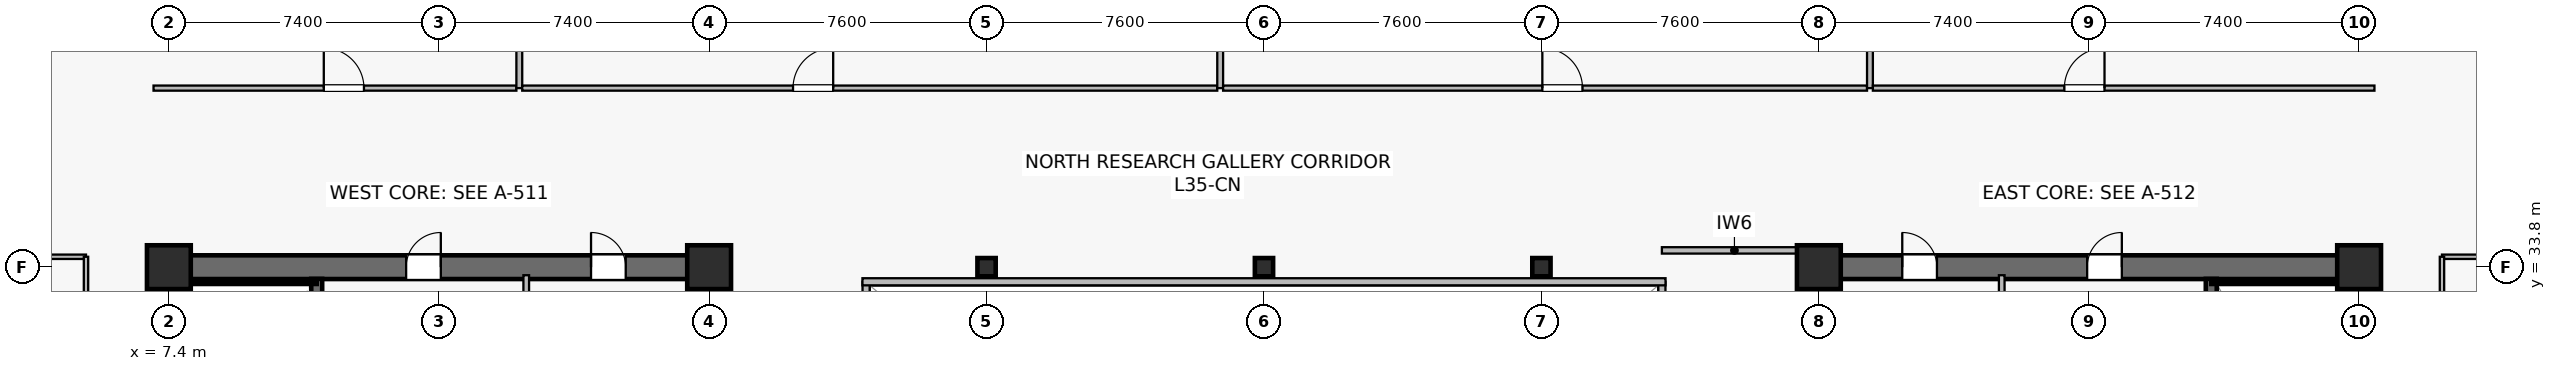
"""IFC4 building model, lengths in metres.
Left out: names, types, materials, properties, quantities, classifications, styles, units other than length and angle.
Written with IfcOpenShell. Run it as: python <this file> out.ifc"""

import sys

from ifc_helpers import new_model, si_unit, direction, frame, frame_2d, origin, origin_2d, place, context, subcontext, project, spatial, rectangle, hollow_rectangle, extrude, source, transform, mapped, element, fill, save


model = new_model("IFC4")
c1 = context("Model", 3, precision=1e-05, world=origin(), true_north=direction((0.0, 1.0)))
c2 = subcontext(c1, "Body", "Model", "MODEL_VIEW")
j1 = project(units=[si_unit("LENGTHUNIT", "METRE"), si_unit("PLANEANGLEUNIT", "RADIAN")], contexts=[c1])
p1 = place(None, origin())
s1 = spatial("IfcSite", under=j1, at=p1, CompositionType="ELEMENT")
p2 = place(p1, origin())
s2 = spatial("IfcBuilding", under=s1, at=p2, CompositionType="ELEMENT")
p3 = place(p2, frame((0.0, 0.0, 146.1)))
s3 = spatial("IfcBuildingStorey", under=s2, at=p3, CompositionType="ELEMENT", Elevation=146.1)
p4 = place(p3, frame((7.075, 33.8, 0.0), z_axis=(0.0, 0.0, 1.0), x_axis=(1.0, 0.0, 0.0)))
e1 = element("IfcWall", 1, at=p4, inside=s3, PredefinedType="SHEAR", context=c2, shape_type="SweptSolid", body=[
    extrude(rectangle(XDim=15.45, YDim=0.65, at=frame_2d((7.725, 0.0))), origin(), (0.0, 0.0, 1.0), 3.79),
])
p5 = place(p4, frame((6.825, 0.0, 0.0)))
e2 = element("IfcOpeningElement", 2, at=p5, cuts=e1, PredefinedType="OPENING", context=c2, shape_type="SweptSolid", body=[
    extrude(rectangle(XDim=0.95, YDim=2.15, at=frame_2d((0.475, 1.075))), frame((0.0, 0.335, 0.0), z_axis=(0.0, -1.0, 0.0), x_axis=(1.0, 0.0, 0.0)), (0.0, 0.0, 1.0), 0.67),
])
p6 = place(p4, frame((11.89, 0.0, 0.0)))
e3 = element("IfcOpeningElement", 3, at=p6, cuts=e1, PredefinedType="OPENING", context=c2, shape_type="SweptSolid", body=[
    extrude(rectangle(XDim=0.95, YDim=2.15, at=frame_2d((0.475, 1.075))), frame((0.0, 0.335, 0.0), z_axis=(0.0, -1.0, 0.0), x_axis=(1.0, 0.0, 0.0)), (0.0, 0.0, 1.0), 0.67),
])
p7 = place(p3, frame((7.4, 15.125, 0.0), z_axis=(0.0, 0.0, 1.0), x_axis=(0.0, 1.0, 0.0)))
e4 = element("IfcWall", 4, at=p7, inside=s3, PredefinedType="SHEAR", context=c2, shape_type="SweptSolid", body=[
    extrude(rectangle(XDim=18.35, YDim=0.65, at=frame_2d((9.175, 0.0))), origin(), (0.0, 0.0, 1.0), 3.79),
])
p8 = place(p3, frame((22.2, 15.125, 0.0), z_axis=(0.0, 0.0, 1.0), x_axis=(0.0, 1.0, 0.0)))
e5 = element("IfcWall", 5, at=p8, inside=s3, PredefinedType="SHEAR", context=c2, shape_type="SweptSolid", body=[
    extrude(rectangle(XDim=18.35, YDim=0.65, at=frame_2d((9.175, 0.0))), origin(), (0.0, 0.0, 1.0), 3.79),
])
p9 = place(p8, frame((3.425, 0.0, 0.0)))
e6 = element("IfcOpeningElement", 6, at=p9, cuts=e5, PredefinedType="OPENING", context=c2, shape_type="SweptSolid", body=[
    extrude(rectangle(XDim=1.42, YDim=2.2, at=frame_2d((0.71, 1.1))), frame((0.0, 0.335, 0.0), z_axis=(0.0, -1.0, 0.0), x_axis=(1.0, 0.0, 0.0)), (0.0, 0.0, 1.0), 0.67),
])
p10 = place(p3, frame((11.45, 24.85, 0.0), z_axis=(0.0, 0.0, 1.0), x_axis=(0.0, 1.0, 0.0)))
e7 = element("IfcWall", 7, at=p10, inside=s3, PredefinedType="SHEAR", context=c2, shape_type="SweptSolid", body=[
    extrude(rectangle(XDim=8.63, YDim=0.3, at=frame_2d((4.315, 0.0))), origin(), (0.0, 0.0, 1.0), 3.79),
])
p11 = place(p10, frame((0.42, 0.0, 0.0)))
e8 = element("IfcOpeningElement", 8, at=p11, cuts=e7, PredefinedType="OPENING", context=c2, shape_type="SweptSolid", body=[
    extrude(rectangle(XDim=1.1, YDim=2.15, at=frame_2d((0.55, 1.075))), frame((0.0, 0.16, 0.0), z_axis=(0.0, -1.0, 0.0), x_axis=(1.0, 0.0, 0.0)), (0.0, 0.0, 1.0), 0.32),
])
p12 = place(p3, frame((7.73, 33.4, 0.0), z_axis=(0.0, 0.0, 1.0), x_axis=(1.0, 0.0, 0.0)))
e9 = element("IfcWall", 9, at=p12, inside=s3, PredefinedType="SOLIDWALL", context=c2, shape_type="SweptSolid", body=[
    extrude(rectangle(XDim=3.72, YDim=0.12, at=frame_2d((1.86, 0.0))), origin(), (0.0, 0.0, 1.0), 3.79),
])
p13 = place(p3, frame((7.73, 25.0, 0.0), z_axis=(0.0, 0.0, 1.0), x_axis=(0.0, 1.0, 0.0)))
e10 = element("IfcWall", 10, at=p13, inside=s3, PredefinedType="SOLIDWALL", context=c2, shape_type="SweptSolid", body=[
    extrude(rectangle(XDim=8.32, YDim=0.12, at=frame_2d((4.16, 0.0))), origin(), (0.0, 0.0, 1.0), 3.79),
])
p14 = place(p3, frame((52.275, 33.8, 0.0), z_axis=(0.0, 0.0, 1.0), x_axis=(1.0, 0.0, 0.0)))
e11 = element("IfcWall", 11, at=p14, inside=s3, PredefinedType="SHEAR", context=c2, shape_type="SweptSolid", body=[
    extrude(rectangle(XDim=15.45, YDim=0.65, at=frame_2d((7.725, 0.0))), origin(), (0.0, 0.0, 1.0), 3.79),
])
p15 = place(p14, frame((7.675, 0.0, 0.0)))
e12 = element("IfcOpeningElement", 12, at=p15, cuts=e11, PredefinedType="OPENING", context=c2, shape_type="SweptSolid", body=[
    extrude(rectangle(XDim=0.95, YDim=2.15, at=frame_2d((0.475, 1.075))), frame((0.0, 0.335, 0.0), z_axis=(0.0, -1.0, 0.0), x_axis=(1.0, 0.0, 0.0)), (0.0, 0.0, 1.0), 0.67),
])
p16 = place(p14, frame((2.61, 0.0, 0.0)))
e13 = element("IfcOpeningElement", 13, at=p16, cuts=e11, PredefinedType="OPENING", context=c2, shape_type="SweptSolid", body=[
    extrude(rectangle(XDim=0.95, YDim=2.15, at=frame_2d((0.475, 1.075))), frame((0.0, 0.335, 0.0), z_axis=(0.0, -1.0, 0.0), x_axis=(1.0, 0.0, 0.0)), (0.0, 0.0, 1.0), 0.67),
])
p17 = place(p3, frame((52.6, 15.125, 0.0), z_axis=(0.0, 0.0, 1.0), x_axis=(0.0, 1.0, 0.0)))
e14 = element("IfcWall", 14, at=p17, inside=s3, PredefinedType="SHEAR", context=c2, shape_type="SweptSolid", body=[
    extrude(rectangle(XDim=18.35, YDim=0.65, at=frame_2d((9.175, 0.0))), origin(), (0.0, 0.0, 1.0), 3.79),
])
p18 = place(p17, frame((3.425, 0.0, 0.0)))
e15 = element("IfcOpeningElement", 15, at=p18, cuts=e14, PredefinedType="OPENING", context=c2, shape_type="SweptSolid", body=[
    extrude(rectangle(XDim=1.42, YDim=2.2, at=frame_2d((0.71, 1.1))), frame((0.0, 0.335, 0.0), z_axis=(0.0, -1.0, 0.0), x_axis=(1.0, 0.0, 0.0)), (0.0, 0.0, 1.0), 0.67),
])
p19 = place(p3, frame((67.4, 15.125, 0.0), z_axis=(0.0, 0.0, 1.0), x_axis=(0.0, 1.0, 0.0)))
e16 = element("IfcWall", 16, at=p19, inside=s3, PredefinedType="SHEAR", context=c2, shape_type="SweptSolid", body=[
    extrude(rectangle(XDim=18.35, YDim=0.65, at=frame_2d((9.175, 0.0))), origin(), (0.0, 0.0, 1.0), 3.79),
])
p20 = place(p3, frame((63.35, 24.85, 0.0), z_axis=(0.0, 0.0, 1.0), x_axis=(0.0, 1.0, 0.0)))
e17 = element("IfcWall", 17, at=p20, inside=s3, PredefinedType="SHEAR", context=c2, shape_type="SweptSolid", body=[
    extrude(rectangle(XDim=8.63, YDim=0.3, at=frame_2d((4.315, 0.0))), origin(), (0.0, 0.0, 1.0), 3.79),
])
p21 = place(p20, frame((0.42, 0.0, 0.0)))
e18 = element("IfcOpeningElement", 18, at=p21, cuts=e17, PredefinedType="OPENING", context=c2, shape_type="SweptSolid", body=[
    extrude(rectangle(XDim=1.1, YDim=2.15, at=frame_2d((0.55, 1.075))), frame((0.0, 0.16, 0.0), z_axis=(0.0, -1.0, 0.0), x_axis=(1.0, 0.0, 0.0)), (0.0, 0.0, 1.0), 0.32),
])
p22 = place(p3, frame((63.35, 33.4, 0.0), z_axis=(0.0, 0.0, 1.0), x_axis=(1.0, 0.0, 0.0)))
e19 = element("IfcWall", 19, at=p22, inside=s3, PredefinedType="SOLIDWALL", context=c2, shape_type="SweptSolid", body=[
    extrude(rectangle(XDim=3.72, YDim=0.12, at=frame_2d((1.86, 0.0))), origin(), (0.0, 0.0, 1.0), 3.79),
])
p23 = place(p3, frame((67.07, 25.0, 0.0), z_axis=(0.0, 0.0, 1.0), x_axis=(0.0, 1.0, 0.0)))
e20 = element("IfcWall", 20, at=p23, inside=s3, PredefinedType="SOLIDWALL", context=c2, shape_type="SweptSolid", body=[
    extrude(rectangle(XDim=8.32, YDim=0.12, at=frame_2d((4.16, 0.0))), origin(), (0.0, 0.0, 1.0), 3.79),
])
m1 = source(origin(), c2, "Body", "SweptSolid", [
    extrude(rectangle(XDim=1.2, YDim=1.2, at=origin_2d()), origin(), (0.0, 0.0, 1.0), 4.1),
])
for number, where, z_axis, x_axis in (
    (21, (7.4, 33.8, 0.0), (0.0, 0.0, 1.0), (1.0, 0.0, 0.0)),
    (22, (22.2, 33.8, 0.0), (0.0, 0.0, 1.0), (1.0, 0.0, 0.0)),
    (23, (52.6, 33.8, 0.0), (0.0, 0.0, 1.0), (1.0, 0.0, 0.0)),
    (24, (67.4, 33.8, 0.0), (0.0, 0.0, 1.0), (1.0, 0.0, 0.0)),
):
    element("IfcColumn", number, at=place(p3, frame(where, z_axis=z_axis, x_axis=x_axis)), inside=s3, PredefinedType="COLUMN", context=c2, shape_type="MappedRepresentation", body=[
        mapped(m1, transform((0.0, 0.0, 0.0), scale=1.0)),
    ])
m2 = source(origin(), c2, "Body", "SweptSolid", [
    extrude(hollow_rectangle(XDim=0.5, YDim=0.5, WallThickness=0.022, at=origin_2d()), origin(), (0.0, 0.0, 1.0), 4.1),
])
for number, where, z_axis, x_axis in (
    (25, (29.8, 33.8, 0.0), (0.0, 0.0, 1.0), (1.0, 0.0, 0.0)),
    (26, (37.4, 33.8, 0.0), (0.0, 0.0, 1.0), (1.0, 0.0, 0.0)),
    (27, (45.0, 33.8, 0.0), (0.0, 0.0, 1.0), (1.0, 0.0, 0.0)),
):
    element("IfcColumn", number, at=place(p3, frame(where, z_axis=z_axis, x_axis=x_axis)), inside=s3, PredefinedType="COLUMN", context=c2, shape_type="MappedRepresentation", body=[
        mapped(m2, transform((0.0, 0.0, 0.0), scale=1.0)),
    ])
for number, where, z_axis, x_axis in (
    (28, (17.19, 29.65, 0.0), (0.0, 0.0, 1.0), (0.0, 1.0, 0.0)),
    (29, (57.61, 29.65, 0.0), (0.0, 0.0, 1.0), (0.0, 1.0, 0.0)),
):
    element("IfcWall", number, at=place(p3, frame(where, z_axis=z_axis, x_axis=x_axis)), inside=s3, PredefinedType="PLUMBINGWALL", context=c2, shape_type="SweptSolid", body=[
        extrude(rectangle(XDim=3.93, YDim=0.155, at=frame_2d((1.965, 0.0))), origin(), (0.0, 0.0, 1.0), 3.79),
    ])
p24 = place(p3, frame((48.3, 34.26, 0.0), z_axis=(0.0, 0.0, 1.0), x_axis=(1.0, 0.0, 0.0)))
e30 = element("IfcWall", 30, at=p24, inside=s3, PredefinedType="PARTITIONING", context=c2, shape_type="SweptSolid", body=[
    extrude(rectangle(XDim=3.975, YDim=0.175, at=frame_2d((1.987, 0.0))), origin(), (0.0, 0.0, 1.0), 3.475),
])
p25 = place(p3, frame((26.5, 15.2, 0.0), z_axis=(0.0, 0.0, 1.0), x_axis=(0.0, 1.0, 0.0)))
e31 = element("IfcWall", 31, at=p25, inside=s3, PredefinedType="SOLIDWALL", context=c2, shape_type="SweptSolid", body=[
    extrude(rectangle(XDim=18.2, YDim=0.195, at=frame_2d((9.1, 0.0))), origin(), (0.0, 0.0, 1.0), 3.79),
])
p26 = place(p25, frame((1.8, 0.0, 0.9)))
e32 = element("IfcOpeningElement", 32, at=p26, cuts=e31, PredefinedType="OPENING", context=c2, shape_type="SweptSolid", body=[
    extrude(rectangle(XDim=1.2, YDim=1.35, at=frame_2d((0.6, 0.675))), frame((0.0, 0.107, 0.0), z_axis=(0.0, -1.0, 0.0), x_axis=(1.0, 0.0, 0.0)), (0.0, 0.0, 1.0), 0.215),
])
p27 = place(p25, frame((13.2, 0.0, 0.9)))
e33 = element("IfcOpeningElement", 33, at=p27, cuts=e31, PredefinedType="OPENING", context=c2, shape_type="SweptSolid", body=[
    extrude(rectangle(XDim=1.2, YDim=1.35, at=frame_2d((0.6, 0.675))), frame((0.0, 0.107, 0.0), z_axis=(0.0, -1.0, 0.0), x_axis=(1.0, 0.0, 0.0)), (0.0, 0.0, 1.0), 0.215),
])
p28 = place(p3, frame((48.3, 15.2, 0.0), z_axis=(0.0, 0.0, 1.0), x_axis=(0.0, 1.0, 0.0)))
e34 = element("IfcWall", 34, at=p28, inside=s3, PredefinedType="SOLIDWALL", context=c2, shape_type="SweptSolid", body=[
    extrude(rectangle(XDim=18.2, YDim=0.195, at=frame_2d((9.1, 0.0))), origin(), (0.0, 0.0, 1.0), 3.79),
])
p29 = place(p28, frame((1.8, 0.0, 0.9)))
e35 = element("IfcOpeningElement", 35, at=p29, cuts=e34, PredefinedType="OPENING", context=c2, shape_type="SweptSolid", body=[
    extrude(rectangle(XDim=1.2, YDim=1.35, at=frame_2d((0.6, 0.675))), frame((0.0, 0.107, 0.0), z_axis=(0.0, -1.0, 0.0), x_axis=(1.0, 0.0, 0.0)), (0.0, 0.0, 1.0), 0.215),
])
p30 = place(p28, frame((13.2, 0.0, 0.9)))
e36 = element("IfcOpeningElement", 36, at=p30, cuts=e34, PredefinedType="OPENING", context=c2, shape_type="SweptSolid", body=[
    extrude(rectangle(XDim=1.2, YDim=1.35, at=frame_2d((0.6, 0.675))), frame((0.0, 0.107, 0.0), z_axis=(0.0, -1.0, 0.0), x_axis=(1.0, 0.0, 0.0)), (0.0, 0.0, 1.0), 0.215),
])
p31 = place(p3, frame((26.4, 33.4, 0.0), z_axis=(0.0, 0.0, 1.0), x_axis=(1.0, 0.0, 0.0)))
e37 = element("IfcWall", 37, at=p31, inside=s3, PredefinedType="SOLIDWALL", context=c2, shape_type="SweptSolid", body=[
    extrude(rectangle(XDim=22.0, YDim=0.195, at=frame_2d((11.0, 0.0))), origin(), (0.0, 0.0, 1.0), 3.79),
])
p32 = place(p3, frame((6.98, 38.705, 0.0), z_axis=(0.0, 0.0, 1.0), x_axis=(1.0, 0.0, 0.0)))
e38 = element("IfcWall", 38, at=p32, inside=s3, PredefinedType="PARTITIONING", context=c2, shape_type="SweptSolid", body=[
    extrude(rectangle(XDim=9.94, YDim=0.14, at=frame_2d((4.97, 0.0))), origin(), (0.0, 0.0, 1.0), 3.125),
])
p33 = place(p32, frame((4.664, 0.0, 0.0)))
e39 = element("IfcOpeningElement", 39, at=p33, cuts=e38, PredefinedType="OPENING", context=c2, shape_type="SweptSolid", body=[
    extrude(rectangle(XDim=1.1, YDim=2.18, at=frame_2d((0.55, 1.09))), frame((0.0, 0.08, 0.0), z_axis=(0.0, -1.0, 0.0), x_axis=(1.0, 0.0, 0.0)), (0.0, 0.0, 1.0), 0.16),
])
p34 = place(p3, frame((17.0, 38.705, 0.0), z_axis=(0.0, 0.0, 1.0), x_axis=(0.0, 1.0, 0.0)))
e40 = element("IfcWall", 40, at=p34, inside=s3, PredefinedType="PARTITIONING", context=c2, shape_type="SweptSolid", body=[
    extrude(rectangle(XDim=8.485, YDim=0.16, at=frame_2d((4.242, 0.0))), origin(), (0.0, 0.0, 1.0), 3.075),
])
p35 = place(p3, frame((17.08, 38.705, 0.0), z_axis=(0.0, 0.0, 1.0), x_axis=(1.0, 0.0, 0.0)))
e41 = element("IfcWall", 41, at=p35, inside=s3, PredefinedType="PARTITIONING", context=c2, shape_type="SweptSolid", body=[
    extrude(rectangle(XDim=19.04, YDim=0.14, at=frame_2d((9.52, 0.0))), origin(), (0.0, 0.0, 1.0), 3.125),
])
p36 = place(p35, frame((7.418, 0.0, 0.0)))
e42 = element("IfcOpeningElement", 42, at=p36, cuts=e41, PredefinedType="OPENING", context=c2, shape_type="SweptSolid", body=[
    extrude(rectangle(XDim=1.1, YDim=2.18, at=frame_2d((0.55, 1.09))), frame((0.0, 0.08, 0.0), z_axis=(0.0, -1.0, 0.0), x_axis=(1.0, 0.0, 0.0)), (0.0, 0.0, 1.0), 0.16),
])
p37 = place(p3, frame((36.2, 38.705, 0.0), z_axis=(0.0, 0.0, 1.0), x_axis=(0.0, 1.0, 0.0)))
e43 = element("IfcWall", 43, at=p37, inside=s3, PredefinedType="PARTITIONING", context=c2, shape_type="SweptSolid", body=[
    extrude(rectangle(XDim=7.285, YDim=0.16, at=frame_2d((3.643, 0.0))), origin(), (0.0, 0.0, 1.0), 3.075),
])
p38 = place(p3, frame((36.28, 38.705, 0.0), z_axis=(0.0, 0.0, 1.0), x_axis=(1.0, 0.0, 0.0)))
e44 = element("IfcWall", 44, at=p38, inside=s3, PredefinedType="PARTITIONING", context=c2, shape_type="SweptSolid", body=[
    extrude(rectangle(XDim=17.64, YDim=0.14, at=frame_2d((8.82, 0.0))), origin(), (0.0, 0.0, 1.0), 3.125),
])
p39 = place(p38, frame((8.745, 0.0, 0.0)))
e45 = element("IfcOpeningElement", 45, at=p39, cuts=e44, PredefinedType="OPENING", context=c2, shape_type="SweptSolid", body=[
    extrude(rectangle(XDim=1.1, YDim=2.18, at=frame_2d((0.55, 1.09))), frame((0.0, 0.08, 0.0), z_axis=(0.0, -1.0, 0.0), x_axis=(1.0, 0.0, 0.0)), (0.0, 0.0, 1.0), 0.16),
])
p40 = place(p3, frame((54.0, 38.705, 0.0), z_axis=(0.0, 0.0, 1.0), x_axis=(0.0, 1.0, 0.0)))
e46 = element("IfcWall", 46, at=p40, inside=s3, PredefinedType="PARTITIONING", context=c2, shape_type="SweptSolid", body=[
    extrude(rectangle(XDim=8.485, YDim=0.16, at=frame_2d((4.242, 0.0))), origin(), (0.0, 0.0, 1.0), 3.075),
])
p41 = place(p3, frame((54.08, 38.705, 0.0), z_axis=(0.0, 0.0, 1.0), x_axis=(1.0, 0.0, 0.0)))
e47 = element("IfcWall", 47, at=p41, inside=s3, PredefinedType="PARTITIONING", context=c2, shape_type="SweptSolid", body=[
    extrude(rectangle(XDim=13.74, YDim=0.14, at=frame_2d((6.87, 0.0))), origin(), (0.0, 0.0, 1.0), 3.125),
])
p42 = place(p41, frame((5.245, 0.0, 0.0)))
e48 = element("IfcOpeningElement", 48, at=p42, cuts=e47, PredefinedType="OPENING", context=c2, shape_type="SweptSolid", body=[
    extrude(rectangle(XDim=1.1, YDim=2.18, at=frame_2d((0.55, 1.09))), frame((0.0, 0.08, 0.0), z_axis=(0.0, -1.0, 0.0), x_axis=(1.0, 0.0, 0.0)), (0.0, 0.0, 1.0), 0.16),
])
p43 = place(p3, frame((2.11, 34.085, 0.0), z_axis=(0.0, 0.0, 1.0), x_axis=(1.0, 0.0, 0.0)))
e49 = element("IfcWall", 49, at=p43, inside=s3, PredefinedType="PARTITIONING", context=c2, shape_type="SweptSolid", body=[
    extrude(rectangle(XDim=3.02, YDim=0.12, at=frame_2d((1.51, 0.0))), origin(), (0.0, 0.0, 1.0), 3.79),
])
p44 = place(p3, frame((5.13, 24.66, 0.0), z_axis=(0.0, 0.0, 1.0), x_axis=(0.0, 1.0, 0.0)))
e50 = element("IfcWall", 50, at=p44, inside=s3, PredefinedType="PARTITIONING", context=c2, shape_type="SweptSolid", body=[
    extrude(rectangle(XDim=9.425, YDim=0.12, at=frame_2d((4.712, 0.0))), origin(), (0.0, 0.0, 1.0), 3.79),
])
p45 = place(p44, frame((4.262, 0.0, 0.0)))
e51 = element("IfcOpeningElement", 51, at=p45, cuts=e50, PredefinedType="OPENING", context=c2, shape_type="SweptSolid", body=[
    extrude(rectangle(XDim=0.9, YDim=2.1, at=frame_2d((0.45, 1.05))), frame((0.0, 0.07, 0.0), z_axis=(0.0, -1.0, 0.0), x_axis=(1.0, 0.0, 0.0)), (0.0, 0.0, 1.0), 0.14),
])
p46 = place(p3, frame((69.67, 34.085, 0.0), z_axis=(0.0, 0.0, 1.0), x_axis=(1.0, 0.0, 0.0)))
e52 = element("IfcWall", 52, at=p46, inside=s3, PredefinedType="PARTITIONING", context=c2, shape_type="SweptSolid", body=[
    extrude(rectangle(XDim=3.02, YDim=0.12, at=frame_2d((1.51, 0.0))), origin(), (0.0, 0.0, 1.0), 3.79),
])
p47 = place(p3, frame((69.67, 26.66, 0.0), z_axis=(0.0, 0.0, 1.0), x_axis=(0.0, 1.0, 0.0)))
e53 = element("IfcWall", 53, at=p47, inside=s3, PredefinedType="PARTITIONING", context=c2, shape_type="SweptSolid", body=[
    extrude(rectangle(XDim=7.425, YDim=0.12, at=frame_2d((3.712, 0.0))), origin(), (0.0, 0.0, 1.0), 3.79),
])
p48 = place(p47, frame((3.262, 0.0, 0.0)))
e54 = element("IfcOpeningElement", 54, at=p48, cuts=e53, PredefinedType="OPENING", context=c2, shape_type="SweptSolid", body=[
    extrude(rectangle(XDim=0.9, YDim=2.1, at=frame_2d((0.45, 1.05))), frame((0.0, 0.07, 0.0), z_axis=(0.0, -1.0, 0.0), x_axis=(1.0, 0.0, 0.0)), (0.0, 0.0, 1.0), 0.14),
])
m3 = source(origin(), c2, "Body", "SweptSolid", [
    extrude(rectangle(XDim=0.95, YDim=2.15, at=frame_2d((0.475, 1.075))), frame((0.0, 0.025, 0.0), z_axis=(0.0, -1.0, 0.0), x_axis=(1.0, 0.0, 0.0)), (0.0, 0.0, 1.0), 0.05),
])
p49 = place(p5, origin())
e55 = element("IfcDoor", 55, at=p49, inside=s3, OperationType="SINGLE_SWING_RIGHT", PredefinedType="DOOR", context=c2, shape_type="MappedRepresentation", body=[
    mapped(m3, transform((0.0, 0.0, 0.0), scale=1.0)),
])
fill(e2, e55)
p50 = place(p6, origin())
e56 = element("IfcDoor", 56, at=p50, inside=s3, OperationType="SINGLE_SWING_LEFT", PredefinedType="DOOR", context=c2, shape_type="MappedRepresentation", body=[
    mapped(m3, transform((0.0, 0.0, 0.0), scale=1.0)),
])
fill(e3, e56)
p51 = place(p15, origin())
e57 = element("IfcDoor", 57, at=p51, inside=s3, OperationType="SINGLE_SWING_RIGHT", PredefinedType="DOOR", context=c2, shape_type="MappedRepresentation", body=[
    mapped(m3, transform((0.0, 0.0, 0.0), scale=1.0)),
])
fill(e12, e57)
p52 = place(p16, origin())
e58 = element("IfcDoor", 58, at=p52, inside=s3, OperationType="SINGLE_SWING_LEFT", PredefinedType="DOOR", context=c2, shape_type="MappedRepresentation", body=[
    mapped(m3, transform((0.0, 0.0, 0.0), scale=1.0)),
])
fill(e13, e58)
m4 = source(origin(), c2, "Body", "SweptSolid", [
    extrude(rectangle(XDim=1.1, YDim=2.18, at=frame_2d((0.55, 1.09))), frame((0.0, 0.025, 0.0), z_axis=(0.0, -1.0, 0.0), x_axis=(1.0, 0.0, 0.0)), (0.0, 0.0, 1.0), 0.05),
])
p53 = place(p33, origin())
e59 = element("IfcDoor", 59, at=p53, inside=s3, OperationType="SINGLE_SWING_LEFT", PredefinedType="DOOR", context=c2, shape_type="MappedRepresentation", body=[
    mapped(m4, transform((0.0, 0.0, 0.0), scale=1.0)),
])
fill(e39, e59)
p54 = place(p36, origin())
e60 = element("IfcDoor", 60, at=p54, inside=s3, OperationType="SINGLE_SWING_RIGHT", PredefinedType="DOOR", context=c2, shape_type="MappedRepresentation", body=[
    mapped(m4, transform((0.0, 0.0, 0.0), scale=1.0)),
])
fill(e42, e60)
p55 = place(p39, origin())
e61 = element("IfcDoor", 61, at=p55, inside=s3, OperationType="SINGLE_SWING_LEFT", PredefinedType="DOOR", context=c2, shape_type="MappedRepresentation", body=[
    mapped(m4, transform((0.0, 0.0, 0.0), scale=1.0)),
])
fill(e45, e61)
p56 = place(p42, origin())
e62 = element("IfcDoor", 62, at=p56, inside=s3, OperationType="SINGLE_SWING_RIGHT", PredefinedType="DOOR", context=c2, shape_type="MappedRepresentation", body=[
    mapped(m4, transform((0.0, 0.0, 0.0), scale=1.0)),
])
fill(e48, e62)
save(model, sys.argv[1])
